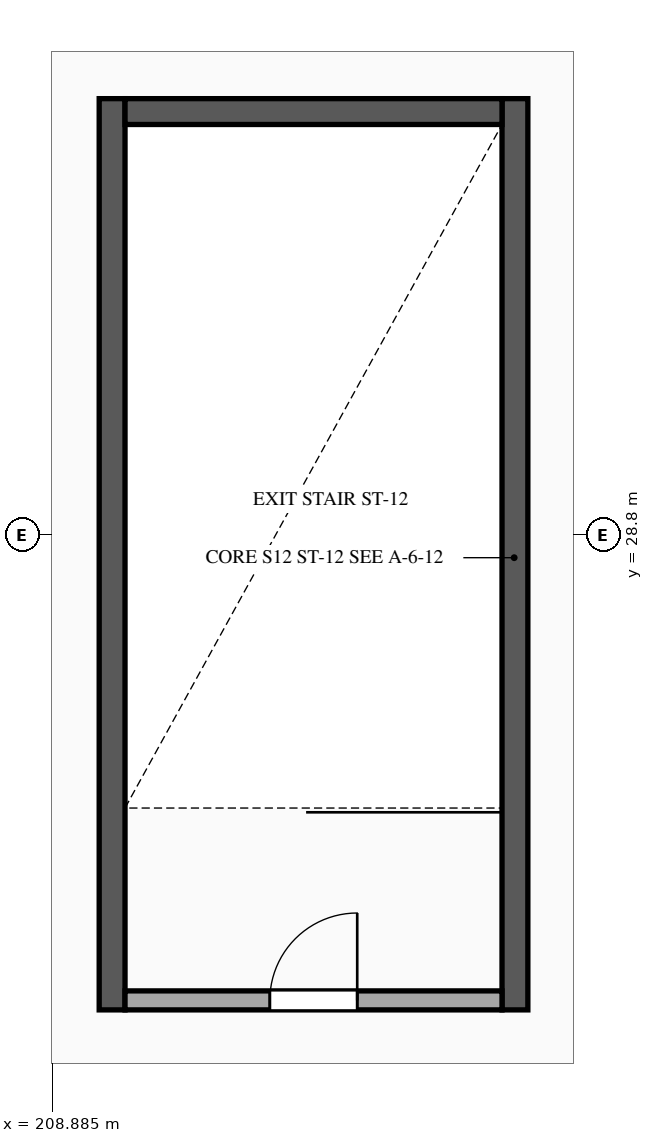
"""IFC4 building model, lengths in metres.
Left out: names, types, materials, properties, quantities, classifications, styles, units other than length and angle.
Written with IfcOpenShell. Run it as: python <this file> out.ifc"""

import sys

from ifc_helpers import new_model, si_unit, direction, frame, frame_2d, origin, place, context, subcontext, project, spatial, rectangle, extrude, element, fill, save


model = new_model("IFC4")
c1 = context("Model", 3, precision=1e-05, world=origin(), true_north=direction((0.0, 1.0)))
c2 = subcontext(c1, "Body", "Model", "MODEL_VIEW")
j1 = project(units=[si_unit("LENGTHUNIT", "METRE"), si_unit("PLANEANGLEUNIT", "RADIAN")], contexts=[c1])
p1 = place(None, origin())
s1 = spatial("IfcSite", under=j1, at=p1, CompositionType="ELEMENT")
p2 = place(p1, origin())
s2 = spatial("IfcBuilding", under=s1, at=p2, CompositionType="ELEMENT")
p3 = place(p2, frame((0.0, 0.0, 10.8)))
s3 = spatial("IfcBuildingStorey", under=s2, at=p3, CompositionType="ELEMENT", Elevation=10.8)
for number, where, z_axis, x_axis in (
    (1, (209.67, 22.55, 0.0), (0.0, 0.0, 1.0), (0.0, 1.0, 0.0)),
    (2, (214.97, 34.54, 0.0), (0.0, 0.0, 1.0), (0.0, -1.0, 0.0)),
):
    element("IfcWall", number, at=place(p3, frame(where, z_axis=z_axis, x_axis=x_axis)), inside=s3, PredefinedType="SHEAR", context=c2, shape_type="SweptSolid", body=[
        extrude(rectangle(XDim=11.99, YDim=0.34, at=frame_2d((5.995, 0.0))), origin(), (0.0, 0.0, 1.0), 4.26),
    ])
p4 = place(p3, frame((209.84, 34.37, 0.0), z_axis=(0.0, 0.0, 1.0), x_axis=(1.0, 0.0, 0.0)))
e3 = element("IfcWall", 3, at=p4, inside=s3, PredefinedType="SHEAR", context=c2, shape_type="SweptSolid", body=[
    extrude(rectangle(XDim=4.96, YDim=0.34, at=frame_2d((2.48, 0.0))), origin(), (0.0, 0.0, 1.0), 4.26),
])
p5 = place(p3, frame((209.84, 22.675, 0.0), z_axis=(0.0, 0.0, 1.0), x_axis=(1.0, 0.0, 0.0)))
e4 = element("IfcWall", 4, at=p5, inside=s3, PredefinedType="STANDARD", context=c2, shape_type="SweptSolid", body=[
    extrude(rectangle(XDim=4.96, YDim=0.25, at=frame_2d((2.48, 0.0))), origin(), (0.0, 0.0, 1.0), 4.22),
])
p6 = place(p5, frame((1.905, 0.0, 0.0)))
e5 = element("IfcOpeningElement", 5, at=p6, cuts=e4, PredefinedType="OPENING", context=c2, shape_type="SweptSolid", body=[
    extrude(rectangle(XDim=1.15, YDim=2.2, at=frame_2d((0.575, 1.1))), frame((0.0, 0.135, 0.0), z_axis=(0.0, -1.0, 0.0), x_axis=(1.0, 0.0, 0.0)), (0.0, 0.0, 1.0), 0.27),
])
p7 = place(p6, origin())
e6 = element("IfcDoor", 6, at=p7, inside=s3, OperationType="SINGLE_SWING_RIGHT", PredefinedType="DOOR", context=c2, shape_type="SweptSolid", body=[
    extrude(rectangle(XDim=1.15, YDim=2.2, at=frame_2d((0.575, 1.1))), frame((0.0, 0.025, 0.0), z_axis=(0.0, -1.0, 0.0), x_axis=(1.0, 0.0, 0.0)), (0.0, 0.0, 1.0), 0.05),
])
fill(e5, e6)
save(model, sys.argv[1])
